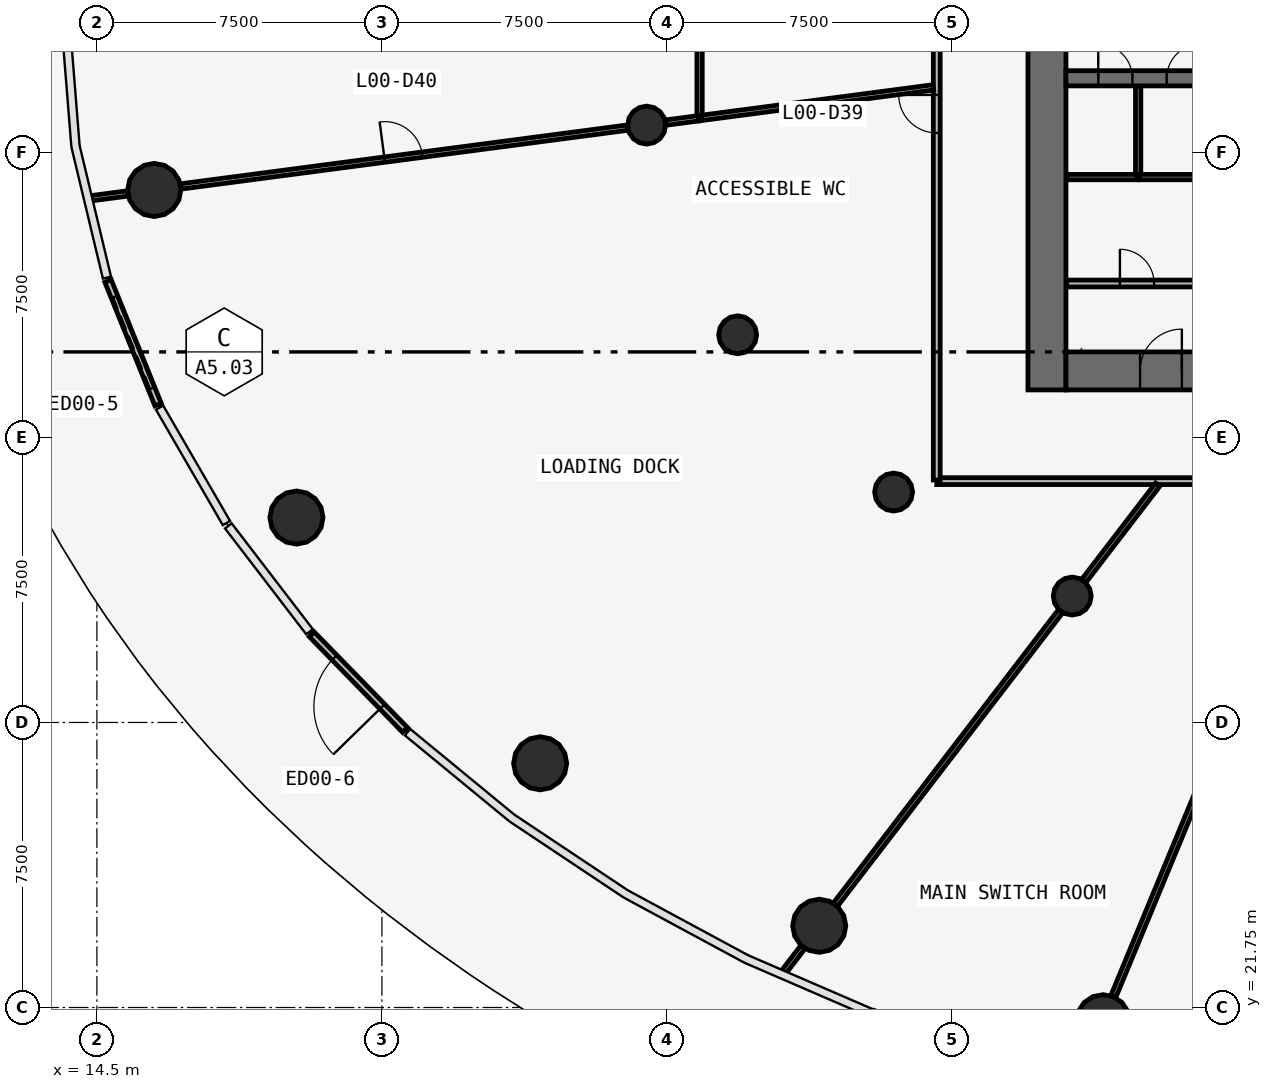
"""IFC4 building model, lengths in metres.
Left out: names, types, materials, properties, quantities, classifications, styles, units other than length and angle.
Written with IfcOpenShell. Run it as: python <this file> out.ifc"""

import sys

from ifc_helpers import new_model, si_unit, direction, frame, frame_2d, origin, origin_2d, place, context, subcontext, project, spatial, rectangle, circle, extrude, source, transform, mapped, element, fill, save


model = new_model("IFC4")
c1 = context("Model", 3, precision=1e-05, world=origin(), true_north=direction((0.0, 1.0)))
c2 = subcontext(c1, "Body", "Model", "MODEL_VIEW")
j1 = project(units=[si_unit("LENGTHUNIT", "METRE"), si_unit("PLANEANGLEUNIT", "RADIAN")], contexts=[c1])
p1 = place(None, origin())
s1 = spatial("IfcSite", under=j1, at=p1, CompositionType="ELEMENT")
p2 = place(p1, origin())
s2 = spatial("IfcBuilding", under=s1, at=p2, CompositionType="ELEMENT")
p3 = place(p2, origin())
s3 = spatial("IfcBuildingStorey", under=s2, at=p3, CompositionType="ELEMENT", Elevation=0.0)
p4 = place(p3, frame((39.5, 58.0, -0.35), z_axis=(0.0, 0.0, 1.0), x_axis=(0.0, -1.0, 0.0)))
e1 = element("IfcWall", 1, at=p4, inside=s3, PredefinedType="SHEAR", context=c2, shape_type="SweptSolid", body=[
    extrude(rectangle(XDim=20.0, YDim=1.0, at=frame_2d((10.0, 0.0))), origin(), (0.0, 0.0, 1.0), 5.35),
])
p5 = place(p4, frame((9.1, 0.0, 0.35)))
e2 = element("IfcOpeningElement", 2, at=p5, cuts=e1, PredefinedType="OPENING", context=c2, shape_type="SweptSolid", body=[
    extrude(rectangle(XDim=1.8, YDim=2.1, at=frame_2d((0.9, 1.05))), frame((0.0, 0.51, 0.0), z_axis=(0.0, -1.0, 0.0), x_axis=(1.0, 0.0, 0.0)), (0.0, 0.0, 1.0), 1.02),
])
p6 = place(p3, frame((40.0, 38.5, -0.35), z_axis=(0.0, 0.0, 1.0), x_axis=(1.0, 0.0, 0.0)))
e3 = element("IfcWall", 3, at=p6, inside=s3, PredefinedType="SHEAR", context=c2, shape_type="SweptSolid", body=[
    extrude(rectangle(XDim=24.0, YDim=1.0, at=frame_2d((12.0, 0.0))), origin(), (0.0, 0.0, 1.0), 5.35),
])
p7 = place(p6, frame((21.45, 0.0, 0.35)))
e4 = element("IfcOpeningElement", 4, at=p7, cuts=e3, PredefinedType="OPENING", context=c2, shape_type="SweptSolid", body=[
    extrude(rectangle(XDim=1.1, YDim=2.1, at=frame_2d((0.55, 1.05))), frame((0.0, 0.51, 0.0), z_axis=(0.0, -1.0, 0.0), x_axis=(1.0, 0.0, 0.0)), (0.0, 0.0, 1.0), 1.02),
])
p8 = place(p6, frame((1.95, 0.0, 0.35)))
e5 = element("IfcOpeningElement", 5, at=p8, cuts=e3, PredefinedType="OPENING", context=c2, shape_type="SweptSolid", body=[
    extrude(rectangle(XDim=1.1, YDim=2.1, at=frame_2d((0.55, 1.05))), frame((0.0, 0.51, 0.0), z_axis=(0.0, -1.0, 0.0), x_axis=(1.0, 0.0, 0.0)), (0.0, 0.0, 1.0), 1.02),
])
p9 = place(p3, frame((40.0, 46.2, -0.35), z_axis=(0.0, 0.0, 1.0), x_axis=(1.0, 0.0, 0.0)))
e6 = element("IfcWall", 6, at=p9, inside=s3, PredefinedType="SHEAR", context=c2, shape_type="SweptSolid", body=[
    extrude(rectangle(XDim=24.0, YDim=0.4, at=frame_2d((12.0, 0.0))), origin(), (0.0, 0.0, 1.0), 5.35),
])
p10 = place(p9, frame((13.4, 0.0, 0.35)))
e7 = element("IfcOpeningElement", 7, at=p10, cuts=e6, PredefinedType="OPENING", context=c2, shape_type="SweptSolid", body=[
    extrude(rectangle(XDim=1.1, YDim=2.1, at=frame_2d((0.55, 1.05))), frame((0.0, 0.21, 0.0), z_axis=(0.0, -1.0, 0.0), x_axis=(1.0, 0.0, 0.0)), (0.0, 0.0, 1.0), 0.42),
])
p11 = place(p9, frame((15.9, 0.0, 0.35)))
e8 = element("IfcOpeningElement", 8, at=p11, cuts=e6, PredefinedType="OPENING", context=c2, shape_type="SweptSolid", body=[
    extrude(rectangle(XDim=1.1, YDim=2.1, at=frame_2d((0.55, 1.05))), frame((0.0, 0.21, 0.0), z_axis=(0.0, -1.0, 0.0), x_axis=(1.0, 0.0, 0.0)), (0.0, 0.0, 1.0), 0.42),
])
p12 = place(p9, frame((18.4, 0.0, 0.35)))
e9 = element("IfcOpeningElement", 9, at=p12, cuts=e6, PredefinedType="OPENING", context=c2, shape_type="SweptSolid", body=[
    extrude(rectangle(XDim=1.1, YDim=2.1, at=frame_2d((0.55, 1.05))), frame((0.0, 0.21, 0.0), z_axis=(0.0, -1.0, 0.0), x_axis=(1.0, 0.0, 0.0)), (0.0, 0.0, 1.0), 0.42),
])
p13 = place(p9, frame((4.5, 0.0, 0.35)))
e10 = element("IfcOpeningElement", 10, at=p13, cuts=e6, PredefinedType="OPENING", context=c2, shape_type="SweptSolid", body=[
    extrude(rectangle(XDim=1.1, YDim=2.1, at=frame_2d((0.55, 1.05))), frame((0.0, 0.21, 0.0), z_axis=(0.0, -1.0, 0.0), x_axis=(1.0, 0.0, 0.0)), (0.0, 0.0, 1.0), 0.42),
])
p14 = place(p9, frame((7.0, 0.0, 0.35)))
e11 = element("IfcOpeningElement", 11, at=p14, cuts=e6, PredefinedType="OPENING", context=c2, shape_type="SweptSolid", body=[
    extrude(rectangle(XDim=1.1, YDim=2.1, at=frame_2d((0.55, 1.05))), frame((0.0, 0.21, 0.0), z_axis=(0.0, -1.0, 0.0), x_axis=(1.0, 0.0, 0.0)), (0.0, 0.0, 1.0), 0.42),
])
p15 = place(p9, frame((9.5, 0.0, 0.35)))
e12 = element("IfcOpeningElement", 12, at=p15, cuts=e6, PredefinedType="OPENING", context=c2, shape_type="SweptSolid", body=[
    extrude(rectangle(XDim=1.1, YDim=2.1, at=frame_2d((0.55, 1.05))), frame((0.0, 0.21, 0.0), z_axis=(0.0, -1.0, 0.0), x_axis=(1.0, 0.0, 0.0)), (0.0, 0.0, 1.0), 0.42),
])
p16 = place(p9, frame((20.45, 0.0, 0.35)))
e13 = element("IfcOpeningElement", 13, at=p16, cuts=e6, PredefinedType="OPENING", context=c2, shape_type="SweptSolid", body=[
    extrude(rectangle(XDim=0.9, YDim=2.1, at=frame_2d((0.45, 1.05))), frame((0.0, 0.21, 0.0), z_axis=(0.0, -1.0, 0.0), x_axis=(1.0, 0.0, 0.0)), (0.0, 0.0, 1.0), 0.42),
])
p17 = place(p9, frame((22.25, 0.0, 0.35)))
e14 = element("IfcOpeningElement", 14, at=p17, cuts=e6, PredefinedType="OPENING", context=c2, shape_type="SweptSolid", body=[
    extrude(rectangle(XDim=0.9, YDim=2.1, at=frame_2d((0.45, 1.05))), frame((0.0, 0.21, 0.0), z_axis=(0.0, -1.0, 0.0), x_axis=(1.0, 0.0, 0.0)), (0.0, 0.0, 1.0), 0.42),
])
p18 = place(p9, frame((0.85, 0.0, 0.35)))
e15 = element("IfcOpeningElement", 15, at=p18, cuts=e6, PredefinedType="OPENING", context=c2, shape_type="SweptSolid", body=[
    extrude(rectangle(XDim=0.9, YDim=2.1, at=frame_2d((0.45, 1.05))), frame((0.0, 0.21, 0.0), z_axis=(0.0, -1.0, 0.0), x_axis=(1.0, 0.0, 0.0)), (0.0, 0.0, 1.0), 0.42),
])
p19 = place(p9, frame((2.65, 0.0, 0.35)))
e16 = element("IfcOpeningElement", 16, at=p19, cuts=e6, PredefinedType="OPENING", context=c2, shape_type="SweptSolid", body=[
    extrude(rectangle(XDim=0.9, YDim=2.1, at=frame_2d((0.45, 1.05))), frame((0.0, 0.21, 0.0), z_axis=(0.0, -1.0, 0.0), x_axis=(1.0, 0.0, 0.0)), (0.0, 0.0, 1.0), 0.42),
])
p20 = place(p9, frame((11.65, 0.0, 0.35)))
e17 = element("IfcOpeningElement", 17, at=p20, cuts=e6, PredefinedType="OPENING", context=c2, shape_type="SweptSolid", body=[
    extrude(rectangle(XDim=0.9, YDim=2.1, at=frame_2d((0.45, 1.05))), frame((0.0, 0.21, 0.0), z_axis=(0.0, -1.0, 0.0), x_axis=(1.0, 0.0, 0.0)), (0.0, 0.0, 1.0), 0.42),
])
m1 = source(origin(), c2, "Body", "SweptSolid", [
    extrude(circle(Radius=0.7, at=origin_2d()), origin(), (0.0, 0.0, 1.0), 5.35),
])
for number, where, z_axis, x_axis in (
    (18, (16.01, 43.262, -0.35), (0.0, 0.0, 1.0), (1.0, 0.0, 0.0)),
    (19, (19.751, 34.642, -0.35), (0.0, 0.0, 1.0), (1.0, 0.0, 0.0)),
    (20, (26.164, 28.176, -0.35), (0.0, 0.0, 1.0), (1.0, 0.0, 0.0)),
    (21, (33.508, 23.9, -0.35), (0.0, 0.0, 1.0), (1.0, 0.0, 0.0)),
    (22, (40.977, 21.389, -0.35), (0.0, 0.0, 1.0), (1.0, 0.0, 0.0)),
):
    element("IfcColumn", number, at=place(p3, frame(where, z_axis=z_axis, x_axis=x_axis)), inside=s3, PredefinedType="COLUMN", context=c2, shape_type="MappedRepresentation", body=[
        mapped(m1, transform((0.0, 0.0, 0.0), scale=1.0)),
    ])
m2 = source(origin(), c2, "Body", "SweptSolid", [
    extrude(circle(Radius=0.5, at=origin_2d()), origin(), (0.0, 0.0, 1.0), 5.35),
])
for number, where, z_axis, x_axis in (
    (23, (28.966, 44.968, -0.35), (0.0, 0.0, 1.0), (1.0, 0.0, 0.0)),
    (24, (31.361, 39.451, -0.35), (0.0, 0.0, 1.0), (1.0, 0.0, 0.0)),
    (25, (35.465, 35.312, -0.35), (0.0, 0.0, 1.0), (1.0, 0.0, 0.0)),
    (26, (40.165, 32.576, -0.35), (0.0, 0.0, 1.0), (1.0, 0.0, 0.0)),
):
    element("IfcColumn", number, at=place(p3, frame(where, z_axis=z_axis, x_axis=x_axis)), inside=s3, PredefinedType="COLUMN", context=c2, shape_type="MappedRepresentation", body=[
        mapped(m2, transform((0.0, 0.0, 0.0), scale=1.0)),
    ])
p21 = place(p3, frame((16.11, 37.615, 0.0), z_axis=(0.0, 0.0, 1.0), x_axis=(-0.37529662437, 0.926904765192, 0.0)))
e27 = element("IfcWall", 27, at=p21, inside=s3, PredefinedType="STANDARD", context=c2, shape_type="SweptSolid", body=[
    extrude(rectangle(XDim=3.51, YDim=0.18, at=frame_2d((1.755, 0.0))), origin(), (0.0, 0.0, 1.0), 4.65),
])
p22 = place(p21, frame((0.455, 0.0, 0.0)))
e28 = element("IfcOpeningElement", 28, at=p22, cuts=e27, PredefinedType="OPENING", context=c2, shape_type="SweptSolid", body=[
    extrude(rectangle(XDim=2.6, YDim=3.2, at=frame_2d((1.3, 1.6))), frame((0.0, 0.1, 0.0), z_axis=(0.0, -1.0, 0.0), x_axis=(1.0, 0.0, 0.0)), (0.0, 0.0, 1.0), 0.2),
])
p23 = place(p3, frame((22.608, 29.055, 0.0), z_axis=(0.0, 0.0, 1.0), x_axis=(-0.698468916807, 0.715640393113, 0.0)))
e29 = element("IfcWall", 29, at=p23, inside=s3, PredefinedType="STANDARD", context=c2, shape_type="SweptSolid", body=[
    extrude(rectangle(XDim=3.512, YDim=0.18, at=frame_2d((1.756, 0.0))), origin(), (0.0, 0.0, 1.0), 4.65),
])
p24 = place(p23, frame((0.856, 0.0, 0.0)))
e30 = element("IfcOpeningElement", 30, at=p24, cuts=e29, PredefinedType="OPENING", context=c2, shape_type="SweptSolid", body=[
    extrude(rectangle(XDim=1.8, YDim=2.3, at=frame_2d((0.9, 1.15))), frame((0.0, 0.1, 0.0), z_axis=(0.0, -1.0, 0.0), x_axis=(1.0, 0.0, 0.0)), (0.0, 0.0, 1.0), 0.2),
])
p25 = place(p3, frame((67.4, 35.6, 0.0), z_axis=(0.0, 0.0, 1.0), x_axis=(-1.0, 0.0, 0.0)))
e31 = element("IfcWall", 31, at=p25, inside=s3, PredefinedType="PARTITIONING", context=c2, shape_type="SweptSolid", body=[
    extrude(rectangle(XDim=30.8, YDim=0.18, at=frame_2d((15.4, 0.0))), origin(), (0.0, 0.0, 1.0), 3.85),
])
p26 = place(p25, frame((20.95, 0.0, 0.0)))
e32 = element("IfcOpeningElement", 32, at=p26, cuts=e31, PredefinedType="OPENING", context=c2, shape_type="SweptSolid", body=[
    extrude(rectangle(XDim=1.0, YDim=2.1, at=frame_2d((0.5, 1.05))), frame((0.0, 0.1, 0.0), z_axis=(0.0, -1.0, 0.0), x_axis=(1.0, 0.0, 0.0)), (0.0, 0.0, 1.0), 0.2),
])
p27 = place(p25, frame((14.95, 0.0, 0.0)))
e33 = element("IfcOpeningElement", 33, at=p27, cuts=e31, PredefinedType="OPENING", context=c2, shape_type="SweptSolid", body=[
    extrude(rectangle(XDim=1.0, YDim=2.1, at=frame_2d((0.5, 1.05))), frame((0.0, 0.1, 0.0), z_axis=(0.0, -1.0, 0.0), x_axis=(1.0, 0.0, 0.0)), (0.0, 0.0, 1.0), 0.2),
])
p28 = place(p25, frame((12.55, 0.0, 0.0)))
e34 = element("IfcOpeningElement", 34, at=p28, cuts=e31, PredefinedType="OPENING", context=c2, shape_type="SweptSolid", body=[
    extrude(rectangle(XDim=1.0, YDim=2.1, at=frame_2d((0.5, 1.05))), frame((0.0, 0.1, 0.0), z_axis=(0.0, -1.0, 0.0), x_axis=(1.0, 0.0, 0.0)), (0.0, 0.0, 1.0), 0.2),
])
p29 = place(p3, frame((36.6, 35.63, 0.0), z_axis=(0.0, 0.0, 1.0), x_axis=(0.0, 1.0, 0.0)))
e35 = element("IfcWall", 35, at=p29, inside=s3, PredefinedType="PARTITIONING", context=c2, shape_type="SweptSolid", body=[
    extrude(rectangle(XDim=23.583, YDim=0.18, at=frame_2d((11.791, 0.0))), origin(), (0.0, 0.0, 1.0), 3.85),
])
p30 = place(p29, frame((16.032, 0.0, 0.0)))
e36 = element("IfcOpeningElement", 36, at=p30, cuts=e35, PredefinedType="OPENING", context=c2, shape_type="SweptSolid", body=[
    extrude(rectangle(XDim=0.9, YDim=2.1, at=frame_2d((0.45, 1.05))), frame((0.0, 0.1, 0.0), z_axis=(0.0, -1.0, 0.0), x_axis=(1.0, 0.0, 0.0)), (0.0, 0.0, 1.0), 0.2),
])
p31 = place(p29, frame((13.232, 0.0, 0.0)))
e37 = element("IfcOpeningElement", 37, at=p31, cuts=e35, PredefinedType="OPENING", context=c2, shape_type="SweptSolid", body=[
    extrude(rectangle(XDim=0.9, YDim=2.1, at=frame_2d((0.45, 1.05))), frame((0.0, 0.1, 0.0), z_axis=(0.0, -1.0, 0.0), x_axis=(1.0, 0.0, 0.0)), (0.0, 0.0, 1.0), 0.2),
])
p32 = place(p29, frame((11.433, 0.0, 0.0)))
e38 = element("IfcOpeningElement", 38, at=p32, cuts=e35, PredefinedType="OPENING", context=c2, shape_type="SweptSolid", body=[
    extrude(rectangle(XDim=0.9, YDim=2.1, at=frame_2d((0.45, 1.05))), frame((0.0, 0.1, 0.0), z_axis=(0.0, -1.0, 0.0), x_axis=(1.0, 0.0, 0.0)), (0.0, 0.0, 1.0), 0.2),
])
p33 = place(p29, frame((9.133, 0.0, 0.0)))
e39 = element("IfcOpeningElement", 39, at=p33, cuts=e35, PredefinedType="OPENING", context=c2, shape_type="SweptSolid", body=[
    extrude(rectangle(XDim=1.0, YDim=2.1, at=frame_2d((0.5, 1.05))), frame((0.0, 0.1, 0.0), z_axis=(0.0, -1.0, 0.0), x_axis=(1.0, 0.0, 0.0)), (0.0, 0.0, 1.0), 0.2),
])
p34 = place(p3, frame((40.02, 40.8, 0.0), z_axis=(0.0, 0.0, 1.0), x_axis=(1.0, 0.0, 0.0)))
e40 = element("IfcWall", 40, at=p34, inside=s3, PredefinedType="PARTITIONING", context=c2, shape_type="SweptSolid", body=[
    extrude(rectangle(XDim=3.75, YDim=0.18, at=frame_2d((1.875, 0.0))), origin(), (0.0, 0.0, 1.0), 4.65),
])
p35 = place(p34, frame((1.4, 0.0, 0.0)))
e41 = element("IfcOpeningElement", 41, at=p35, cuts=e40, PredefinedType="OPENING", context=c2, shape_type="SweptSolid", body=[
    extrude(rectangle(XDim=0.9, YDim=2.1, at=frame_2d((0.45, 1.05))), frame((0.0, 0.1, 0.0), z_axis=(0.0, -1.0, 0.0), x_axis=(1.0, 0.0, 0.0)), (0.0, 0.0, 1.0), 0.2),
])
p36 = place(p3, frame((16.708, 43.354, 0.0), z_axis=(0.0, 0.0, 1.0), x_axis=(0.991446586451, 0.130513088287, 0.0)))
e42 = element("IfcWall", 42, at=p36, inside=s3, PredefinedType="PARTITIONING", context=c2, shape_type="SweptSolid", body=[
    extrude(rectangle(XDim=11.86, YDim=0.14, at=frame_2d((5.93, 0.0))), origin(), (0.0, 0.0, 1.0), 3.85),
])
p37 = place(p36, frame((5.41, 0.0, 0.0)))
e43 = element("IfcOpeningElement", 43, at=p37, cuts=e42, PredefinedType="OPENING", context=c2, shape_type="SweptSolid", body=[
    extrude(rectangle(XDim=1.0, YDim=2.1, at=frame_2d((0.5, 1.05))), frame((0.0, 0.08, 0.0), z_axis=(0.0, -1.0, 0.0), x_axis=(1.0, 0.0, 0.0)), (0.0, 0.0, 1.0), 0.16),
])
p38 = place(p3, frame((39.858, 32.176, 0.0), z_axis=(0.0, 0.0, 1.0), x_axis=(-0.608770295053, -0.793346537057, 0.0)))
e44 = element("IfcWall", 44, at=p38, inside=s3, PredefinedType="PARTITIONING", context=c2, shape_type="SweptSolid", body=[
    extrude(rectangle(XDim=9.727, YDim=0.14, at=frame_2d((4.864, 0.0))), origin(), (0.0, 0.0, 1.0), 3.85),
])
p39 = place(p3, frame((44.752, 30.502, 0.0), z_axis=(0.0, 0.0, 1.0), x_axis=(-0.382672728165, -0.923883966264, 0.0)))
e45 = element("IfcWall", 45, at=p39, inside=s3, PredefinedType="PARTITIONING", context=c2, shape_type="SweptSolid", body=[
    extrude(rectangle(XDim=9.16, YDim=0.14, at=frame_2d((4.58, 0.0))), origin(), (0.0, 0.0, 1.0), 3.85),
])
p40 = place(p3, frame((36.51, 45.961, 0.0), z_axis=(0.0, 0.0, 1.0), x_axis=(-0.991444112872, -0.130531877526, 0.0)))
e46 = element("IfcWall", 46, at=p40, inside=s3, PredefinedType="PARTITIONING", context=c2, shape_type="SweptSolid", body=[
    extrude(rectangle(XDim=6.204, YDim=0.14, at=frame_2d((3.102, 0.0))), origin(), (0.0, 0.0, 1.0), 3.85),
])
p41 = place(p3, frame((30.359, 50.426, 0.0), z_axis=(0.0, 0.0, 1.0), x_axis=(0.0, -1.0, 0.0)))
e47 = element("IfcWall", 47, at=p41, inside=s3, PredefinedType="PARTITIONING", context=c2, shape_type="SweptSolid", body=[
    extrude(rectangle(XDim=5.204, YDim=0.14, at=frame_2d((2.602, 0.0))), origin(), (0.0, 0.0, 1.0), 3.85),
])
p42 = place(p3, frame((42.416, 35.51, 0.0), z_axis=(0.0, 0.0, 1.0), x_axis=(-0.60874605662, -0.793365135703, 0.0)))
e48 = element("IfcWall", 48, at=p42, inside=s3, PredefinedType="PARTITIONING", context=c2, shape_type="SweptSolid", body=[
    extrude(rectangle(XDim=3.194, YDim=0.14, at=frame_2d((1.597, 0.0))), origin(), (0.0, 0.0, 1.0), 3.85),
])
p43 = place(p3, frame((41.9, 43.6, 0.0), z_axis=(0.0, 0.0, 1.0), x_axis=(0.0, 1.0, 0.0)))
e49 = element("IfcWall", 49, at=p43, inside=s3, PredefinedType="PARTITIONING", context=c2, shape_type="SweptSolid", body=[
    extrude(rectangle(XDim=2.39, YDim=0.14, at=frame_2d((1.195, 0.0))), origin(), (0.0, 0.0, 1.0), 3.85),
])
p44 = place(p3, frame((43.77, 43.6, 0.0), z_axis=(0.0, 0.0, 1.0), x_axis=(-1.0, 0.0, 0.0)))
e50 = element("IfcWall", 50, at=p44, inside=s3, PredefinedType="PARTITIONING", context=c2, shape_type="SweptSolid", body=[
    extrude(rectangle(XDim=1.84, YDim=0.14, at=frame_2d((0.92, 0.0))), origin(), (0.0, 0.0, 1.0), 3.85),
])
p45 = place(p3, frame((41.87, 43.6, 0.0), z_axis=(0.0, 0.0, 1.0), x_axis=(-1.0, 0.0, 0.0)))
e51 = element("IfcWall", 51, at=p45, inside=s3, PredefinedType="PARTITIONING", context=c2, shape_type="SweptSolid", body=[
    extrude(rectangle(XDim=1.85, YDim=0.14, at=frame_2d((0.925, 0.0))), origin(), (0.0, 0.0, 1.0), 3.85),
])
p46 = place(p3, frame((15.311, 43.17, 0.0), z_axis=(0.0, 0.0, 1.0), x_axis=(-0.991417173479, -0.130736330569, 0.0)))
e52 = element("IfcWall", 52, at=p46, inside=s3, PredefinedType="PARTITIONING", context=c2, shape_type="SweptSolid", body=[
    extrude(rectangle(XDim=1.008, YDim=0.14, at=frame_2d((0.504, 0.0))), origin(), (0.0, 0.0, 1.0), 3.85),
])
p47 = place(p3, frame((30.33, 45.147, 0.0), z_axis=(0.0, 0.0, 1.0), x_axis=(-0.991463836503, -0.130381980762, 0.0)))
e53 = element("IfcWall", 53, at=p47, inside=s3, PredefinedType="PARTITIONING", context=c2, shape_type="SweptSolid", body=[
    extrude(rectangle(XDim=0.871, YDim=0.14, at=frame_2d((0.435, 0.0))), origin(), (0.0, 0.0, 1.0), 3.85),
])
p48 = place(p3, frame((33.079, 23.342, 0.0), z_axis=(0.0, 0.0, 1.0), x_axis=(-0.608939798959, -0.793216440351, 0.0)))
e54 = element("IfcWall", 54, at=p48, inside=s3, PredefinedType="PARTITIONING", context=c2, shape_type="SweptSolid", body=[
    extrude(rectangle(XDim=0.827, YDim=0.14, at=frame_2d((0.413, 0.0))), origin(), (0.0, 0.0, 1.0), 3.85),
])
m3 = source(origin(), c2, "Body", "SweptSolid", [
    extrude(rectangle(XDim=2.6, YDim=3.2, at=frame_2d((1.3, 1.6))), frame((0.0, 0.025, 0.0), z_axis=(0.0, -1.0, 0.0), x_axis=(1.0, 0.0, 0.0)), (0.0, 0.0, 1.0), 0.05),
])
p49 = place(p22, origin())
e55 = element("IfcDoor", 55, at=p49, inside=s3, OperationType="ROLLINGUP", PredefinedType="DOOR", context=c2, shape_type="MappedRepresentation", body=[
    mapped(m3, transform((0.0, 0.0, 0.0), scale=1.0)),
])
fill(e28, e55)
m4 = source(origin(), c2, "Body", "SweptSolid", [
    extrude(rectangle(XDim=1.8, YDim=2.3, at=frame_2d((0.9, 1.15))), frame((0.0, 0.025, 0.0), z_axis=(0.0, -1.0, 0.0), x_axis=(1.0, 0.0, 0.0)), (0.0, 0.0, 1.0), 0.05),
])
p50 = place(p24, origin())
e56 = element("IfcDoor", 56, at=p50, inside=s3, OperationType="DOUBLE_DOOR_SINGLE_SWING", PredefinedType="DOOR", context=c2, shape_type="MappedRepresentation", body=[
    mapped(m4, transform((0.0, 0.0, 0.0), scale=1.0)),
])
fill(e30, e56)
m5 = source(origin(), c2, "Body", "SweptSolid", [
    extrude(rectangle(XDim=1.1, YDim=2.1, at=frame_2d((0.55, 1.05))), frame((0.0, 0.025, 0.0), z_axis=(0.0, -1.0, 0.0), x_axis=(1.0, 0.0, 0.0)), (0.0, 0.0, 1.0), 0.05),
])
p51 = place(p8, origin())
e57 = element("IfcDoor", 57, at=p51, inside=s3, OperationType="SINGLE_SWING_RIGHT", PredefinedType="DOOR", context=c2, shape_type="MappedRepresentation", body=[
    mapped(m5, transform((0.0, 0.0, 0.0), scale=1.0)),
])
fill(e5, e57)
m6 = source(origin(), c2, "Body", "SweptSolid", [
    extrude(rectangle(XDim=1.0, YDim=2.1, at=frame_2d((0.5, 1.05))), frame((0.0, 0.025, 0.0), z_axis=(0.0, -1.0, 0.0), x_axis=(1.0, 0.0, 0.0)), (0.0, 0.0, 1.0), 0.05),
])
p52 = place(p33, origin())
e58 = element("IfcDoor", 58, at=p52, inside=s3, OperationType="SINGLE_SWING_RIGHT", PredefinedType="DOOR", context=c2, shape_type="MappedRepresentation", body=[
    mapped(m6, transform((0.0, 0.0, 0.0), scale=1.0)),
])
fill(e39, e58)
p53 = place(p37, origin())
e59 = element("IfcDoor", 59, at=p53, inside=s3, OperationType="SINGLE_SWING_LEFT", PredefinedType="DOOR", context=c2, shape_type="MappedRepresentation", body=[
    mapped(m6, transform((0.0, 0.0, 0.0), scale=1.0)),
])
fill(e43, e59)
m7 = source(origin(), c2, "Body", "SweptSolid", [
    extrude(rectangle(XDim=0.9, YDim=2.1, at=frame_2d((0.45, 1.05))), frame((0.0, 0.025, 0.0), z_axis=(0.0, -1.0, 0.0), x_axis=(1.0, 0.0, 0.0)), (0.0, 0.0, 1.0), 0.05),
])
p54 = place(p35, origin())
e60 = element("IfcDoor", 60, at=p54, inside=s3, OperationType="SINGLE_SWING_LEFT", PredefinedType="DOOR", context=c2, shape_type="MappedRepresentation", body=[
    mapped(m7, transform((0.0, 0.0, 0.0), scale=1.0)),
])
fill(e41, e60)
p55 = place(p18, origin())
e61 = element("IfcDoor", 61, at=p55, inside=s3, OperationType="SINGLE_SWING_LEFT", PredefinedType="DOOR", context=c2, shape_type="MappedRepresentation", body=[
    mapped(m7, transform((0.0, 0.0, 0.0), scale=1.0)),
])
fill(e15, e61)
p56 = place(p19, origin())
e62 = element("IfcDoor", 62, at=p56, inside=s3, OperationType="SINGLE_SWING_RIGHT", PredefinedType="DOOR", context=c2, shape_type="MappedRepresentation", body=[
    mapped(m7, transform((0.0, 0.0, 0.0), scale=1.0)),
])
fill(e16, e62)
save(model, sys.argv[1])
